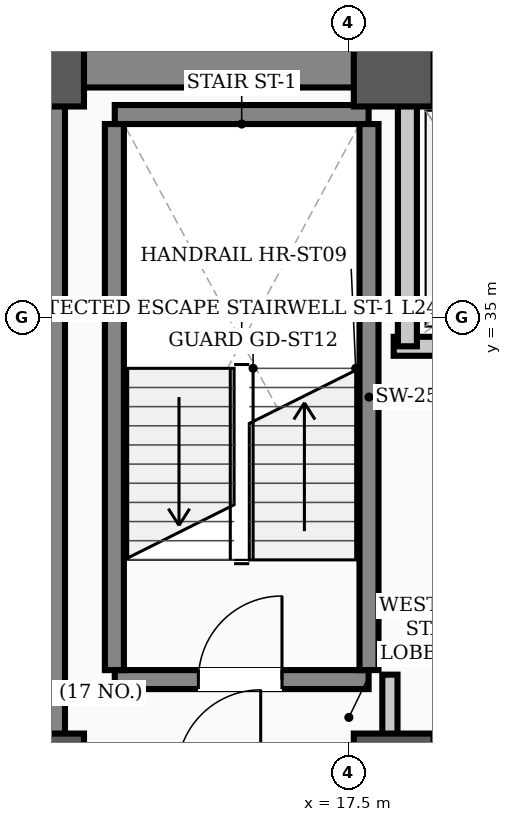
"""IFC4 building model, lengths in metres.
Left out: names, types, materials, properties, quantities, classifications, styles, units other than length and angle.
Written with IfcOpenShell. Run it as: python <this file> out.ifc"""

import sys

from ifc_helpers import new_model, si_unit, direction, frame, frame_2d, origin, origin_2d, place, context, subcontext, project, spatial, rectangle, hollow_rectangle, extrude, element, fill, save


model = new_model("IFC4")
c1 = context("Model", 3, precision=1e-05, world=origin(), true_north=direction((0.0, 1.0)))
c2 = subcontext(c1, "Body", "Model", "MODEL_VIEW")
j1 = project(units=[si_unit("LENGTHUNIT", "METRE"), si_unit("PLANEANGLEUNIT", "RADIAN")], contexts=[c1])
p1 = place(None, origin())
s1 = spatial("IfcSite", under=j1, at=p1, CompositionType="ELEMENT")
p2 = place(p1, origin())
s2 = spatial("IfcBuilding", under=s1, at=p2, CompositionType="ELEMENT")
p3 = place(p2, frame((0.0, 0.0, 96.7)))
s3 = spatial("IfcBuildingStorey", under=s2, at=p3, CompositionType="ELEMENT", Elevation=96.7)
for number, where, z_axis, x_axis in (
    (1, (13.5, 29.0, 0.0), (0.0, 0.0, 1.0), (1.0, 0.0, 0.0)),
    (2, (13.5, 38.3, 0.0), (0.0, 0.0, 1.0), (1.0, 0.0, 0.0)),
    (3, (18.1, 29.0, 0.0), (0.0, 0.0, 1.0), (1.0, 0.0, 0.0)),
    (4, (18.1, 38.3, 0.0), (0.0, 0.0, 1.0), (1.0, 0.0, 0.0)),
):
    element("IfcColumn", number, at=place(p3, frame(where, z_axis=z_axis, x_axis=x_axis)), inside=s3, PredefinedType="COLUMN", context=c2, shape_type="SweptSolid", body=[
        extrude(hollow_rectangle(XDim=1.05, YDim=1.05, WallThickness=0.038, InnerFilletRadius=0.019, OuterFilletRadius=0.057, at=origin_2d()), origin(), (0.0, 0.0, 1.0), 3.9),
    ])
p4 = place(p3, frame((13.5, 38.3, 0.0), z_axis=(0.0, 0.0, 1.0), x_axis=(1.0, 0.0, 0.0)))
e5 = element("IfcWall", 5, at=p4, inside=s3, PredefinedType="SHEAR", context=c2, shape_type="SweptSolid", body=[
    extrude(rectangle(XDim=30.5, YDim=0.55, at=frame_2d((15.25, 0.0))), origin(), (0.0, 0.0, 1.0), 3.6),
])
p5 = place(p3, frame((13.5, 29.35, 0.0), z_axis=(0.0, 0.0, 1.0), x_axis=(0.0, 1.0, 0.0)))
e6 = element("IfcWall", 6, at=p5, inside=s3, PredefinedType="SHEAR", context=c2, shape_type="SweptSolid", body=[
    extrude(rectangle(XDim=8.6, YDim=0.55, at=frame_2d((4.3, 0.0))), origin(), (0.0, 0.0, 1.0), 3.6),
])
p6 = place(p3, frame((14.43, 30.235, 0.0), z_axis=(0.0, 0.0, 1.0), x_axis=(1.0, 0.0, 0.0)))
e7 = element("IfcWall", 7, at=p6, inside=s3, PredefinedType="STANDARD", context=c2, shape_type="SweptSolid", body=[
    extrude(rectangle(XDim=3.34, YDim=0.25, at=frame_2d((1.67, 0.0))), origin(), (0.0, 0.0, 1.0), 3.6),
])
p7 = place(p6, frame((1.1, 0.0, 0.0)))
e8 = element("IfcOpeningElement", 8, at=p7, cuts=e7, PredefinedType="OPENING", context=c2, shape_type="SweptSolid", body=[
    extrude(rectangle(XDim=1.1, YDim=2.08, at=frame_2d((0.55, 1.04))), frame((0.0, 0.135, 0.0), z_axis=(0.0, -1.0, 0.0), x_axis=(1.0, 0.0, 0.0)), (0.0, 0.0, 1.0), 0.27),
])
p8 = place(p3, frame((14.43, 37.669, 0.0), z_axis=(0.0, 0.0, 1.0), x_axis=(1.0, 0.0, 0.0)))
e9 = element("IfcWall", 9, at=p8, inside=s3, PredefinedType="STANDARD", context=c2, shape_type="SweptSolid", body=[
    extrude(rectangle(XDim=3.34, YDim=0.25, at=frame_2d((1.67, 0.0))), origin(), (0.0, 0.0, 1.0), 3.6),
])
for number, where, z_axis, x_axis in (
    (10, (14.425, 30.36, 0.0), (0.0, 0.0, 1.0), (0.0, 1.0, 0.0)),
    (11, (17.775, 30.36, 0.0), (0.0, 0.0, 1.0), (0.0, 1.0, 0.0)),
):
    element("IfcWall", number, at=place(p3, frame(where, z_axis=z_axis, x_axis=x_axis)), inside=s3, PredefinedType="STANDARD", context=c2, shape_type="SweptSolid", body=[
        extrude(rectangle(XDim=7.184, YDim=0.25, at=frame_2d((3.592, 0.0))), origin(), (0.0, 0.0, 1.0), 3.6),
    ])
p9 = place(p3, frame((18.1, 34.62, 0.0), z_axis=(0.0, 0.0, 1.0), x_axis=(1.0, 0.0, 0.0)))
e12 = element("IfcWall", 12, at=p9, inside=s3, PredefinedType="STANDARD", context=c2, shape_type="SweptSolid", body=[
    extrude(rectangle(XDim=5.35, YDim=0.25, at=frame_2d((2.675, 0.0))), origin(), (0.0, 0.0, 1.0), 3.6),
])
p10 = place(p9, frame((0.85, 0.0, 0.0)))
e13 = element("IfcOpeningElement", 13, at=p10, cuts=e12, PredefinedType="OPENING", context=c2, shape_type="SweptSolid", body=[
    extrude(rectangle(XDim=1.1, YDim=2.08, at=frame_2d((0.55, 1.04))), frame((0.0, 0.135, 0.0), z_axis=(0.0, -1.0, 0.0), x_axis=(1.0, 0.0, 0.0)), (0.0, 0.0, 1.0), 0.27),
])
p11 = place(p9, frame((3.45, 0.0, 0.0)))
e14 = element("IfcOpeningElement", 14, at=p11, cuts=e12, PredefinedType="OPENING", context=c2, shape_type="SweptSolid", body=[
    extrude(rectangle(XDim=1.1, YDim=2.08, at=frame_2d((0.55, 1.04))), frame((0.0, 0.135, 0.0), z_axis=(0.0, -1.0, 0.0), x_axis=(1.0, 0.0, 0.0)), (0.0, 0.0, 1.0), 0.27),
])
p12 = place(p3, frame((18.28, 34.62, 0.0), z_axis=(0.0, 0.0, 1.0), x_axis=(0.0, 1.0, 0.0)))
e15 = element("IfcWall", 15, at=p12, inside=s3, PredefinedType="STANDARD", context=c2, shape_type="SweptSolid", body=[
    extrude(rectangle(XDim=3.33, YDim=0.25, at=frame_2d((1.665, 0.0))), origin(), (0.0, 0.0, 1.0), 2.18),
])
p13 = place(p3, frame((18.05, 29.285, 0.0), z_axis=(0.0, 0.0, 1.0), x_axis=(0.0, 1.0, 0.0)))
e16 = element("IfcWall", 16, at=p13, inside=s3, PredefinedType="STANDARD", context=c2, shape_type="SweptSolid", body=[
    extrude(rectangle(XDim=1.015, YDim=0.2, at=frame_2d((0.508, 0.0))), origin(), (0.0, 0.0, 1.0), 2.18),
])
p14 = place(p7, origin())
e17 = element("IfcDoor", 17, at=p14, inside=s3, OperationType="SINGLE_SWING_RIGHT", PredefinedType="DOOR", context=c2, shape_type="SweptSolid", body=[
    extrude(rectangle(XDim=1.1, YDim=2.08, at=frame_2d((0.55, 1.04))), frame((0.0, 0.025, 0.0), z_axis=(0.0, -1.0, 0.0), x_axis=(1.0, 0.0, 0.0)), (0.0, 0.0, 1.0), 0.05),
])
fill(e8, e17)
save(model, sys.argv[1])
